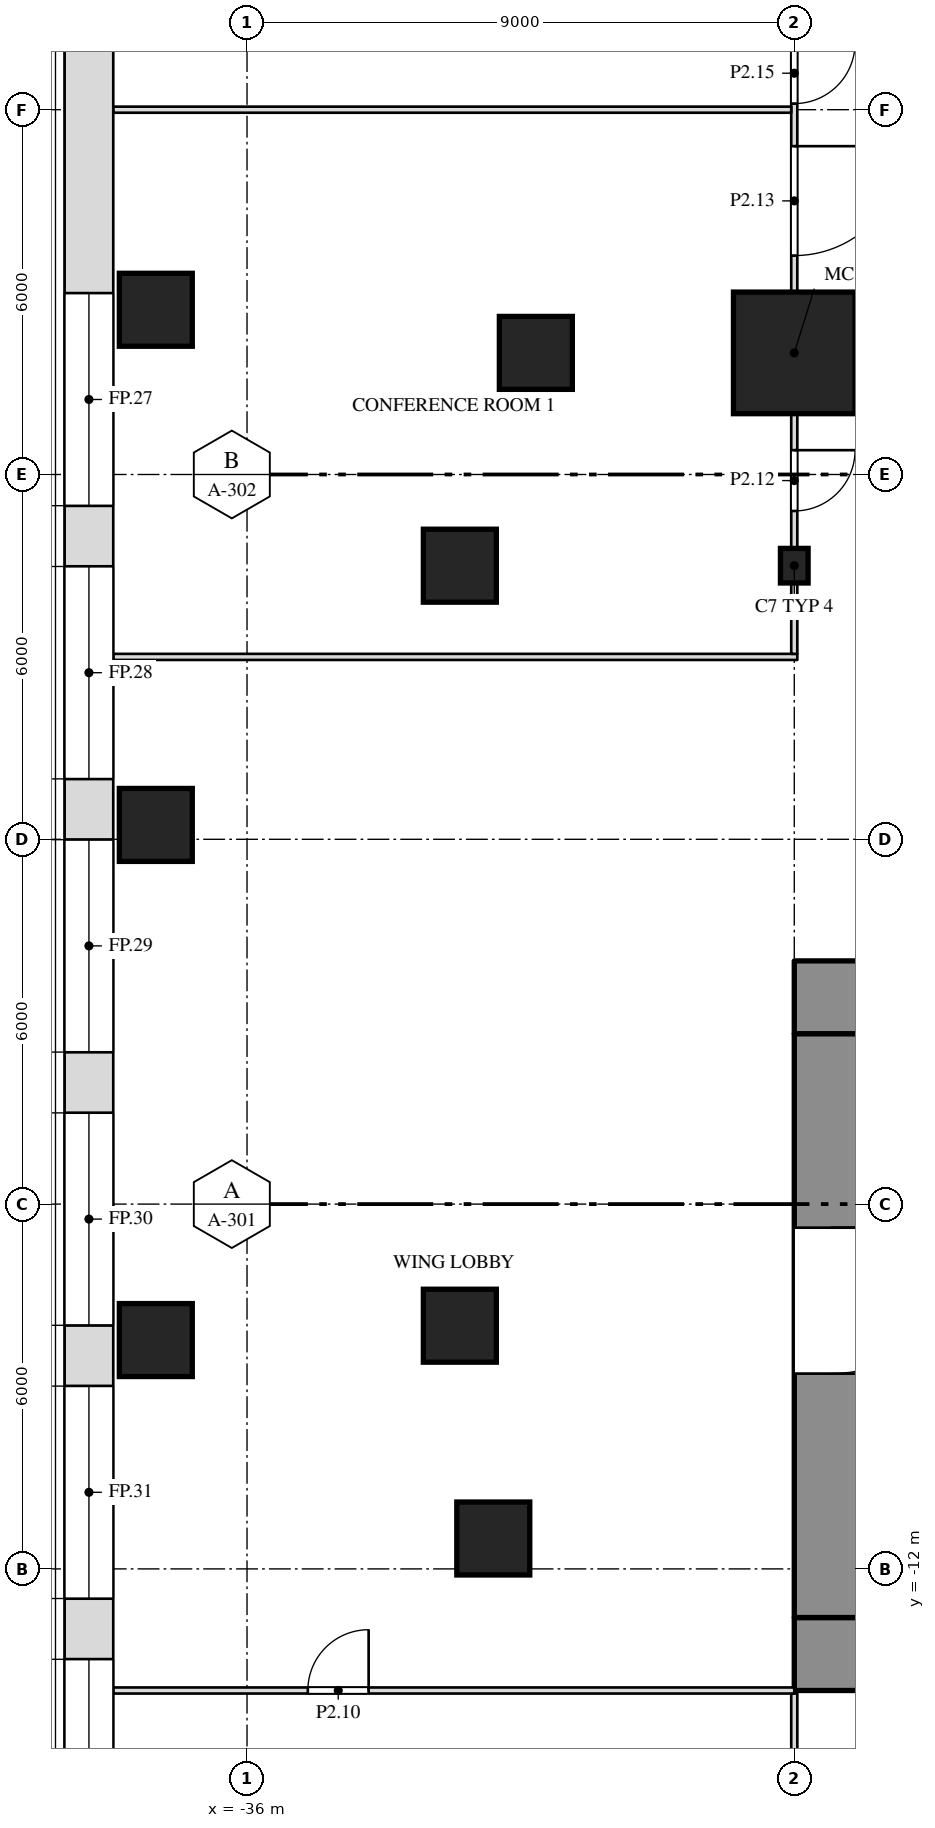
"""IFC4 building model, lengths in metres.
Left out: names, types, materials, properties, quantities, classifications, styles, units other than length and angle.
Written with IfcOpenShell. Run it as: python <this file> out.ifc"""

import sys

from ifc_helpers import new_model, si_unit, direction, frame, frame_2d, origin, origin_2d, place, context, subcontext, project, spatial, rectangle, i_section, extrude, element, fill, save


model = new_model("IFC4")
c1 = context("Model", 3, precision=1e-05, world=origin(), true_north=direction((0.0, 1.0)))
c2 = subcontext(c1, "Body", "Model", "MODEL_VIEW")
j1 = project(units=[si_unit("LENGTHUNIT", "METRE"), si_unit("PLANEANGLEUNIT", "RADIAN")], contexts=[c1])
p1 = place(None, origin())
s1 = spatial("IfcSite", under=j1, at=p1, CompositionType="ELEMENT")
p2 = place(p1, origin())
s2 = spatial("IfcBuilding", under=s1, at=p2, CompositionType="ELEMENT")
p3 = place(p2, frame((0.0, 0.0, 15.0)))
s3 = spatial("IfcBuildingStorey", under=s2, at=p3, CompositionType="ELEMENT", Elevation=15.0)
for number, where, z_axis, x_axis in (
    (1, (-31.95, -11.5, 0.0), (0.0, 0.0, 1.0), (1.0, 0.0, 0.0)),
    (2, (-37.5, -8.236, 0.0), (0.0, 0.0, 1.0), (1.0, 0.0, 0.0)),
    (3, (-32.5, -8.0, 0.0), (0.0, 0.0, 1.0), (1.0, 0.0, 0.0)),
    (4, (-37.5, 0.236, 0.0), (0.0, 0.0, 1.0), (1.0, 0.0, 0.0)),
    (5, (-32.5, 4.5, 0.0), (0.0, 0.0, 1.0), (1.0, 0.0, 0.0)),
):
    element("IfcColumn", number, at=place(p3, frame(where, z_axis=z_axis, x_axis=x_axis)), inside=s3, PredefinedType="COLUMN", context=c2, shape_type="SweptSolid", body=[
        extrude(rectangle(XDim=1.2, YDim=1.2, at=origin_2d()), origin(), (0.0, 0.0, 1.0), 6.0),
    ])
p4 = place(p3, frame((-27.0, 4.5, 0.0), z_axis=(0.0, 0.0, 1.0), x_axis=(1.0, 0.0, 0.0)))
e6 = element("IfcColumn", 6, at=p4, inside=s3, PredefinedType="COLUMN", context=c2, shape_type="SweptSolid", body=[
    extrude(i_section(OverallWidth=0.455, OverallDepth=0.569, WebThickness=0.078, FlangeThickness=0.125, at=origin_2d()), origin(), (0.0, 0.0, 1.0), 6.0),
])
p5 = place(p3, frame((-31.25, 8.0, 0.0), z_axis=(0.0, 0.0, 1.0), x_axis=(1.0, 0.0, 0.0)))
e7 = element("IfcColumn", 7, at=p5, inside=s3, PredefinedType="COLUMN", context=c2, shape_type="SweptSolid", body=[
    extrude(rectangle(XDim=1.2, YDim=1.2, at=origin_2d()), origin(), (0.0, 0.0, 1.0), 6.0),
])
p6 = place(p3, frame((-27.0, 8.0, 0.0), z_axis=(0.0, 0.0, 1.0), x_axis=(1.0, 0.0, 0.0)))
e8 = element("IfcColumn", 8, at=p6, inside=s3, PredefinedType="COLUMN", context=c2, shape_type="SweptSolid", body=[
    extrude(rectangle(XDim=2.0, YDim=2.0, at=origin_2d()), origin(), (0.0, 0.0, 1.0), 6.0),
])
p7 = place(p3, frame((-37.5, 8.709, 0.0), z_axis=(0.0, 0.0, 1.0), x_axis=(1.0, 0.0, 0.0)))
e9 = element("IfcColumn", 9, at=p7, inside=s3, PredefinedType="COLUMN", context=c2, shape_type="SweptSolid", body=[
    extrude(rectangle(XDim=1.2, YDim=1.2, at=origin_2d()), origin(), (0.0, 0.0, 1.0), 6.0),
])
p8 = place(p3, frame((-27.0, -2.6, 0.0), z_axis=(0.0, 0.0, 1.0), x_axis=(1.0, 0.0, 0.0)))
e10 = element("IfcWall", 10, at=p8, inside=s3, PredefinedType="SHEAR", context=c2, shape_type="SweptSolid", body=[
    extrude(rectangle(XDim=54.0, YDim=1.2, at=frame_2d((27.0, 0.0))), origin(), (0.0, 0.0, 1.0), 5.7),
])
p9 = place(p3, frame((-27.0, -13.4, 0.0), z_axis=(0.0, 0.0, 1.0), x_axis=(1.0, 0.0, 0.0)))
e11 = element("IfcWall", 11, at=p9, inside=s3, PredefinedType="SHEAR", context=c2, shape_type="SweptSolid", body=[
    extrude(rectangle(XDim=54.0, YDim=1.2, at=frame_2d((27.0, 0.0))), origin(), (0.0, 0.0, 1.0), 5.7),
])
p10 = place(p9, frame((16.45, 0.0, 0.0)))
e12 = element("IfcOpeningElement", 12, at=p10, cuts=e11, PredefinedType="OPENING", context=c2, shape_type="SweptSolid", body=[
    extrude(rectangle(XDim=1.0, YDim=2.1, at=frame_2d((0.5, 1.05))), frame((0.0, 0.612, 0.0), z_axis=(0.0, -1.0, 0.0), x_axis=(1.0, 0.0, 0.0)), (0.0, 0.0, 1.0), 1.224),
])
p11 = place(p9, frame((36.55, 0.0, 0.0)))
e13 = element("IfcOpeningElement", 13, at=p11, cuts=e11, PredefinedType="OPENING", context=c2, shape_type="SweptSolid", body=[
    extrude(rectangle(XDim=1.0, YDim=2.1, at=frame_2d((0.5, 1.05))), frame((0.0, 0.612, 0.0), z_axis=(0.0, -1.0, 0.0), x_axis=(1.0, 0.0, 0.0)), (0.0, 0.0, 1.0), 1.224),
])
p12 = place(p3, frame((-26.4, -12.8, 0.0), z_axis=(0.0, 0.0, 1.0), x_axis=(0.0, 1.0, 0.0)))
e14 = element("IfcWall", 14, at=p12, inside=s3, PredefinedType="SHEAR", context=c2, shape_type="SweptSolid", body=[
    extrude(rectangle(XDim=9.6, YDim=1.2, at=frame_2d((4.8, 0.0))), origin(), (0.0, 0.0, 1.0), 5.7),
])
p13 = place(p12, frame((4.012, 0.0, 0.0)))
e15 = element("IfcOpeningElement", 15, at=p13, cuts=e14, PredefinedType="OPENING", context=c2, shape_type="SweptSolid", body=[
    extrude(rectangle(XDim=2.4, YDim=2.1, at=frame_2d((1.2, 1.05))), frame((0.0, 0.612, 0.0), z_axis=(0.0, -1.0, 0.0), x_axis=(1.0, 0.0, 0.0)), (0.0, 0.0, 1.0), 1.224),
])
p14 = place(p3, frame((-27.0, -16.9, 0.0), z_axis=(0.0, 0.0, 1.0), x_axis=(0.0, 1.0, 0.0)))
e16 = element("IfcWall", 16, at=p14, inside=s3, PredefinedType="PARTITIONING", context=c2, shape_type="SweptSolid", body=[
    extrude(rectangle(XDim=2.85, YDim=0.1, at=frame_2d((1.425, 0.0))), origin(), (0.0, 0.0, 1.0), 5.088),
])
p15 = place(p3, frame((-38.2, -14.0, 0.0), z_axis=(0.0, 0.0, 1.0), x_axis=(1.0, 0.0, 0.0)))
e17 = element("IfcWall", 17, at=p15, inside=s3, PredefinedType="PARTITIONING", context=c2, shape_type="SweptSolid", body=[
    extrude(rectangle(XDim=11.2, YDim=0.1, at=frame_2d((5.6, 0.0))), origin(), (0.0, 0.0, 1.0), 5.7),
])
p16 = place(p15, frame((3.2, 0.0, 0.0)))
e18 = element("IfcOpeningElement", 18, at=p16, cuts=e17, PredefinedType="OPENING", context=c2, shape_type="SweptSolid", body=[
    extrude(rectangle(XDim=1.0, YDim=2.1, at=frame_2d((0.5, 1.05))), frame((0.0, 0.062, 0.0), z_axis=(0.0, -1.0, 0.0), x_axis=(1.0, 0.0, 0.0)), (0.0, 0.0, 1.0), 0.124),
])
p17 = place(p3, frame((-38.2, 3.0, 0.0), z_axis=(0.0, 0.0, 1.0), x_axis=(1.0, 0.0, 0.0)))
e19 = element("IfcWall", 19, at=p17, inside=s3, PredefinedType="PARTITIONING", context=c2, shape_type="SweptSolid", body=[
    extrude(rectangle(XDim=11.25, YDim=0.1, at=frame_2d((5.625, 0.0))), origin(), (0.0, 0.0, 1.0), 5.7),
])
p18 = place(p3, frame((-27.0, 3.05, 0.0), z_axis=(0.0, 0.0, 1.0), x_axis=(0.0, 1.0, 0.0)))
e20 = element("IfcWall", 20, at=p18, inside=s3, PredefinedType="PARTITIONING", context=c2, shape_type="SweptSolid", body=[
    extrude(rectangle(XDim=1.166, YDim=0.1, at=frame_2d((0.583, 0.0))), origin(), (0.0, 0.0, 1.0), 5.088),
])
p19 = place(p3, frame((-27.0, 4.784, 0.0), z_axis=(0.0, 0.0, 1.0), x_axis=(0.0, 1.0, 0.0)))
e21 = element("IfcWall", 21, at=p19, inside=s3, PredefinedType="PARTITIONING", context=c2, shape_type="SweptSolid", body=[
    extrude(rectangle(XDim=2.216, YDim=0.1, at=frame_2d((1.108, 0.0))), origin(), (0.0, 0.0, 1.0), 5.088),
])
p20 = place(p19, frame((0.615, 0.0, 0.0)))
e22 = element("IfcOpeningElement", 22, at=p20, cuts=e21, PredefinedType="OPENING", context=c2, shape_type="SweptSolid", body=[
    extrude(rectangle(XDim=1.0, YDim=2.1, at=frame_2d((0.5, 1.05))), frame((0.0, 0.062, 0.0), z_axis=(0.0, -1.0, 0.0), x_axis=(1.0, 0.0, 0.0)), (0.0, 0.0, 1.0), 0.124),
])
p21 = place(p3, frame((-27.0, 9.0, 0.0), z_axis=(0.0, 0.0, 1.0), x_axis=(0.0, 1.0, 0.0)))
e23 = element("IfcWall", 23, at=p21, inside=s3, PredefinedType="PARTITIONING", context=c2, shape_type="SweptSolid", body=[
    extrude(rectangle(XDim=8.4, YDim=0.1, at=frame_2d((4.2, 0.0))), origin(), (0.0, 0.0, 1.0), 5.088),
])
p22 = place(p21, frame((0.6, 0.0, 0.0)))
e24 = element("IfcOpeningElement", 24, at=p22, cuts=e23, PredefinedType="OPENING", context=c2, shape_type="SweptSolid", body=[
    extrude(rectangle(XDim=1.8, YDim=2.1, at=frame_2d((0.9, 1.05))), frame((0.0, 0.062, 0.0), z_axis=(0.0, -1.0, 0.0), x_axis=(1.0, 0.0, 0.0)), (0.0, 0.0, 1.0), 0.124),
])
p23 = place(p21, frame((3.1, 0.0, 0.0)))
e25 = element("IfcOpeningElement", 25, at=p23, cuts=e23, PredefinedType="OPENING", context=c2, shape_type="SweptSolid", body=[
    extrude(rectangle(XDim=1.0, YDim=2.1, at=frame_2d((0.5, 1.05))), frame((0.0, 0.062, 0.0), z_axis=(0.0, -1.0, 0.0), x_axis=(1.0, 0.0, 0.0)), (0.0, 0.0, 1.0), 0.124),
])
p24 = place(p21, frame((5.0, 0.0, 0.0)))
e26 = element("IfcOpeningElement", 26, at=p24, cuts=e23, PredefinedType="OPENING", context=c2, shape_type="SweptSolid", body=[
    extrude(rectangle(XDim=1.8, YDim=2.1, at=frame_2d((0.9, 1.05))), frame((0.0, 0.062, 0.0), z_axis=(0.0, -1.0, 0.0), x_axis=(1.0, 0.0, 0.0)), (0.0, 0.0, 1.0), 0.124),
])
p25 = place(p3, frame((-38.2, 12.0, 0.0), z_axis=(0.0, 0.0, 1.0), x_axis=(1.0, 0.0, 0.0)))
e27 = element("IfcWall", 27, at=p25, inside=s3, PredefinedType="PARTITIONING", context=c2, shape_type="SweptSolid", body=[
    extrude(rectangle(XDim=11.15, YDim=0.1, at=frame_2d((5.575, 0.0))), origin(), (0.0, 0.0, 1.0), 5.7),
])
p26 = place(p3, frame((-38.6, 13.948, 0.0), z_axis=(0.0, 0.0, 1.0), x_axis=(0.0, -1.0, 0.0)))
e28 = element("IfcWall", 28, at=p26, inside=s3, PredefinedType="SOLIDWALL", context=c2, shape_type="SweptSolid", body=[
    extrude(rectangle(XDim=35.895, YDim=0.8, at=frame_2d((17.948, 0.0))), origin(), (0.0, 0.0, 1.0), 5.7),
])
p27 = place(p26, frame((4.964, 0.0, 1.0)))
e29 = element("IfcOpeningElement", 29, at=p27, cuts=e28, PredefinedType="OPENING", context=c2, shape_type="SweptSolid", body=[
    extrude(rectangle(XDim=3.5, YDim=4.0, at=frame_2d((1.75, 2.0))), frame((0.0, 0.412, 0.0), z_axis=(0.0, -1.0, 0.0), x_axis=(1.0, 0.0, 0.0)), (0.0, 0.0, 1.0), 0.824),
])
p28 = place(p26, frame((9.458, 0.0, 1.0)))
e30 = element("IfcOpeningElement", 30, at=p28, cuts=e28, PredefinedType="OPENING", context=c2, shape_type="SweptSolid", body=[
    extrude(rectangle(XDim=3.5, YDim=4.0, at=frame_2d((1.75, 2.0))), frame((0.0, 0.412, 0.0), z_axis=(0.0, -1.0, 0.0), x_axis=(1.0, 0.0, 0.0)), (0.0, 0.0, 1.0), 0.824),
])
p29 = place(p26, frame((13.951, 0.0, 1.0)))
e31 = element("IfcOpeningElement", 31, at=p29, cuts=e28, PredefinedType="OPENING", context=c2, shape_type="SweptSolid", body=[
    extrude(rectangle(XDim=3.5, YDim=4.0, at=frame_2d((1.75, 2.0))), frame((0.0, 0.412, 0.0), z_axis=(0.0, -1.0, 0.0), x_axis=(1.0, 0.0, 0.0)), (0.0, 0.0, 1.0), 0.824),
])
p30 = place(p26, frame((18.444, 0.0, 1.0)))
e32 = element("IfcOpeningElement", 32, at=p30, cuts=e28, PredefinedType="OPENING", context=c2, shape_type="SweptSolid", body=[
    extrude(rectangle(XDim=3.5, YDim=4.0, at=frame_2d((1.75, 2.0))), frame((0.0, 0.412, 0.0), z_axis=(0.0, -1.0, 0.0), x_axis=(1.0, 0.0, 0.0)), (0.0, 0.0, 1.0), 0.824),
])
p31 = place(p26, frame((22.938, 0.0, 1.0)))
e33 = element("IfcOpeningElement", 33, at=p31, cuts=e28, PredefinedType="OPENING", context=c2, shape_type="SweptSolid", body=[
    extrude(rectangle(XDim=3.5, YDim=4.0, at=frame_2d((1.75, 2.0))), frame((0.0, 0.412, 0.0), z_axis=(0.0, -1.0, 0.0), x_axis=(1.0, 0.0, 0.0)), (0.0, 0.0, 1.0), 0.824),
])
p32 = place(p26, frame((27.431, 0.0, 1.0)))
e34 = element("IfcOpeningElement", 34, at=p32, cuts=e28, PredefinedType="OPENING", context=c2, shape_type="SweptSolid", body=[
    extrude(rectangle(XDim=3.5, YDim=4.0, at=frame_2d((1.75, 2.0))), frame((0.0, 0.412, 0.0), z_axis=(0.0, -1.0, 0.0), x_axis=(1.0, 0.0, 0.0)), (0.0, 0.0, 1.0), 0.824),
])
p33 = place(p16, origin())
e35 = element("IfcDoor", 35, at=p33, inside=s3, OperationType="SINGLE_SWING_RIGHT", PredefinedType="DOOR", context=c2, shape_type="SweptSolid", body=[
    extrude(rectangle(XDim=1.0, YDim=2.1, at=frame_2d((0.5, 1.05))), frame((0.0, 0.025, 0.0), z_axis=(0.0, -1.0, 0.0), x_axis=(1.0, 0.0, 0.0)), (0.0, 0.0, 1.0), 0.05),
])
fill(e18, e35)
p34 = place(p20, origin())
e36 = element("IfcDoor", 36, at=p34, inside=s3, OperationType="SINGLE_SWING_LEFT", PredefinedType="DOOR", context=c2, shape_type="SweptSolid", body=[
    extrude(rectangle(XDim=1.0, YDim=2.1, at=frame_2d((0.5, 1.05))), frame((0.0, 0.025, 0.0), z_axis=(0.0, -1.0, 0.0), x_axis=(1.0, 0.0, 0.0)), (0.0, 0.0, 1.0), 0.05),
])
fill(e22, e36)
p35 = place(p22, origin())
e37 = element("IfcDoor", 37, at=p35, inside=s3, OperationType="DOUBLE_DOOR_SINGLE_SWING", PredefinedType="DOOR", context=c2, shape_type="SweptSolid", body=[
    extrude(rectangle(XDim=1.8, YDim=2.1, at=frame_2d((0.9, 1.05))), frame((0.0, 0.025, 0.0), z_axis=(0.0, -1.0, 0.0), x_axis=(1.0, 0.0, 0.0)), (0.0, 0.0, 1.0), 0.05),
])
fill(e24, e37)
p36 = place(p23, origin())
e38 = element("IfcDoor", 38, at=p36, inside=s3, OperationType="SINGLE_SWING_LEFT", PredefinedType="DOOR", context=c2, shape_type="SweptSolid", body=[
    extrude(rectangle(XDim=1.0, YDim=2.1, at=frame_2d((0.5, 1.05))), frame((0.0, 0.025, 0.0), z_axis=(0.0, -1.0, 0.0), x_axis=(1.0, 0.0, 0.0)), (0.0, 0.0, 1.0), 0.05),
])
fill(e25, e38)
p37 = place(p27, origin())
e39 = element("IfcWindow", 39, at=p37, inside=s3, PartitioningType="SINGLE_PANEL", PredefinedType="WINDOW", context=c2, shape_type="SweptSolid", body=[
    extrude(rectangle(XDim=3.5, YDim=4.0, at=frame_2d((1.75, 2.0))), frame((0.0, 0.03, 0.0), z_axis=(0.0, -1.0, 0.0), x_axis=(1.0, 0.0, 0.0)), (0.0, 0.0, 1.0), 0.06),
])
fill(e29, e39)
p38 = place(p28, origin())
e40 = element("IfcWindow", 40, at=p38, inside=s3, PartitioningType="SINGLE_PANEL", PredefinedType="WINDOW", context=c2, shape_type="SweptSolid", body=[
    extrude(rectangle(XDim=3.5, YDim=4.0, at=frame_2d((1.75, 2.0))), frame((0.0, 0.03, 0.0), z_axis=(0.0, -1.0, 0.0), x_axis=(1.0, 0.0, 0.0)), (0.0, 0.0, 1.0), 0.06),
])
fill(e30, e40)
p39 = place(p29, origin())
e41 = element("IfcWindow", 41, at=p39, inside=s3, PartitioningType="SINGLE_PANEL", PredefinedType="WINDOW", context=c2, shape_type="SweptSolid", body=[
    extrude(rectangle(XDim=3.5, YDim=4.0, at=frame_2d((1.75, 2.0))), frame((0.0, 0.03, 0.0), z_axis=(0.0, -1.0, 0.0), x_axis=(1.0, 0.0, 0.0)), (0.0, 0.0, 1.0), 0.06),
])
fill(e31, e41)
p40 = place(p30, origin())
e42 = element("IfcWindow", 42, at=p40, inside=s3, PartitioningType="SINGLE_PANEL", PredefinedType="WINDOW", context=c2, shape_type="SweptSolid", body=[
    extrude(rectangle(XDim=3.5, YDim=4.0, at=frame_2d((1.75, 2.0))), frame((0.0, 0.03, 0.0), z_axis=(0.0, -1.0, 0.0), x_axis=(1.0, 0.0, 0.0)), (0.0, 0.0, 1.0), 0.06),
])
fill(e32, e42)
p41 = place(p31, origin())
e43 = element("IfcWindow", 43, at=p41, inside=s3, PartitioningType="SINGLE_PANEL", PredefinedType="WINDOW", context=c2, shape_type="SweptSolid", body=[
    extrude(rectangle(XDim=3.5, YDim=4.0, at=frame_2d((1.75, 2.0))), frame((0.0, 0.03, 0.0), z_axis=(0.0, -1.0, 0.0), x_axis=(1.0, 0.0, 0.0)), (0.0, 0.0, 1.0), 0.06),
])
fill(e33, e43)
p42 = place(p32, origin())
e44 = element("IfcWindow", 44, at=p42, inside=s3, PartitioningType="SINGLE_PANEL", PredefinedType="WINDOW", context=c2, shape_type="SweptSolid", body=[
    extrude(rectangle(XDim=3.5, YDim=4.0, at=frame_2d((1.75, 2.0))), frame((0.0, 0.03, 0.0), z_axis=(0.0, -1.0, 0.0), x_axis=(1.0, 0.0, 0.0)), (0.0, 0.0, 1.0), 0.06),
])
fill(e34, e44)
p43 = place(p13, origin())
e45 = element("IfcDoor", 45, at=p43, inside=s3, OperationType="DOUBLE_DOOR_SINGLE_SWING", PredefinedType="DOOR", context=c2, shape_type="SweptSolid", body=[
    extrude(rectangle(XDim=2.4, YDim=2.1, at=frame_2d((1.2, 1.05))), frame((0.0, 0.025, 0.0), z_axis=(0.0, -1.0, 0.0), x_axis=(1.0, 0.0, 0.0)), (0.0, 0.0, 1.0), 0.05),
])
fill(e15, e45)
save(model, sys.argv[1])
